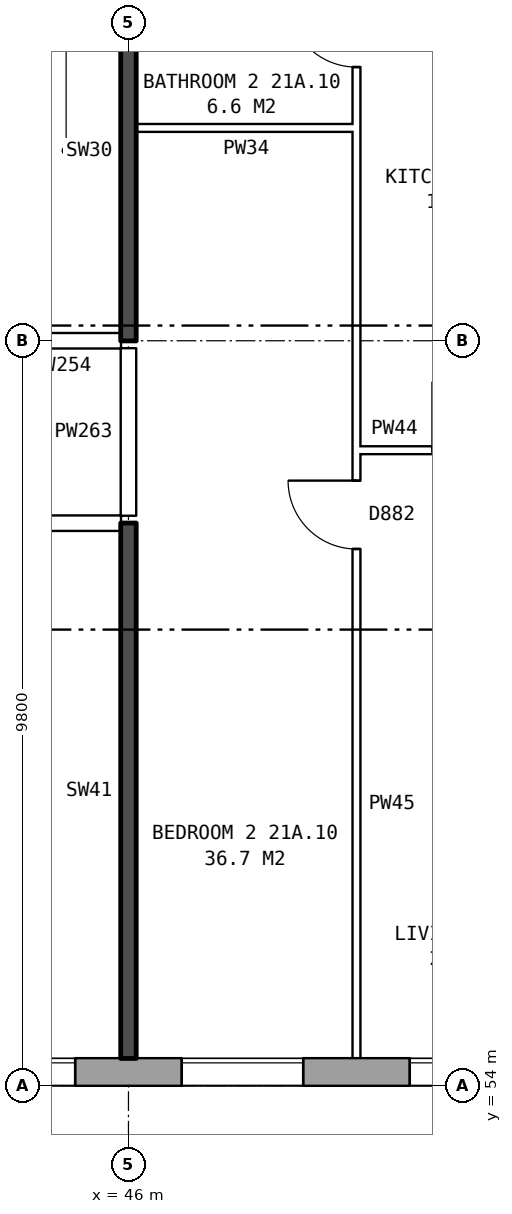
"""IFC4 building model, lengths in metres.
Left out: names, types, materials, properties, quantities, classifications, styles, units other than length and angle.
Written with IfcOpenShell. Run it as: python <this file> out.ifc"""

import sys

from ifc_helpers import new_model, si_unit, direction, frame, frame_2d, origin, place, context, subcontext, project, spatial, rectangle, extrude, element, fill, save


model = new_model("IFC4")
c1 = context("Model", 3, precision=1e-05, world=origin(), true_north=direction((0.0, 1.0)))
c2 = subcontext(c1, "Body", "Model", "MODEL_VIEW")
j1 = project(units=[si_unit("LENGTHUNIT", "METRE"), si_unit("PLANEANGLEUNIT", "RADIAN")], contexts=[c1])
p1 = place(None, origin())
s1 = spatial("IfcSite", under=j1, at=p1, CompositionType="ELEMENT")
p2 = place(p1, origin())
s2 = spatial("IfcBuilding", under=s1, at=p2, CompositionType="ELEMENT")
p3 = place(p2, frame((0.0, 0.0, 77.8)))
s3 = spatial("IfcBuildingStorey", under=s2, at=p3, CompositionType="ELEMENT", Elevation=77.8)
p4 = place(p3, frame((26.325, 54.18, 0.0), z_axis=(0.0, 0.0, 1.0), x_axis=(1.0, 0.0, 0.0)))
e1 = element("IfcWall", 1, at=p4, inside=s3, PredefinedType="STANDARD", context=c2, shape_type="SweptSolid", body=[
    extrude(rectangle(XDim=46.601, YDim=0.36, at=frame_2d((23.3, 0.0))), origin(), (0.0, 0.0, 1.0), 2.85),
])
p5 = place(p4, frame((2.375, 0.0, 0.8)))
e2 = element("IfcOpeningElement", 2, at=p5, cuts=e1, PredefinedType="OPENING", context=c2, shape_type="SweptSolid", body=[
    extrude(rectangle(XDim=1.6, YDim=1.8, at=frame_2d((0.8, 0.9))), frame((0.0, 0.19, 0.0), z_axis=(0.0, -1.0, 0.0), x_axis=(1.0, 0.0, 0.0)), (0.0, 0.0, 1.0), 0.38),
])
p6 = place(p4, frame((5.375, 0.0, 0.8)))
e3 = element("IfcOpeningElement", 3, at=p6, cuts=e1, PredefinedType="OPENING", context=c2, shape_type="SweptSolid", body=[
    extrude(rectangle(XDim=1.6, YDim=1.8, at=frame_2d((0.8, 0.9))), frame((0.0, 0.19, 0.0), z_axis=(0.0, -1.0, 0.0), x_axis=(1.0, 0.0, 0.0)), (0.0, 0.0, 1.0), 0.38),
])
p7 = place(p4, frame((7.875, 0.0, 0.8)))
e4 = element("IfcOpeningElement", 4, at=p7, cuts=e1, PredefinedType="OPENING", context=c2, shape_type="SweptSolid", body=[
    extrude(rectangle(XDim=1.6, YDim=1.8, at=frame_2d((0.8, 0.9))), frame((0.0, 0.19, 0.0), z_axis=(0.0, -1.0, 0.0), x_axis=(1.0, 0.0, 0.0)), (0.0, 0.0, 1.0), 0.38),
])
p8 = place(p4, frame((11.725, 0.0, 0.65)))
e5 = element("IfcOpeningElement", 5, at=p8, cuts=e1, PredefinedType="OPENING", context=c2, shape_type="SweptSolid", body=[
    extrude(rectangle(XDim=0.8, YDim=0.9, at=frame_2d((0.4, 0.45))), frame((0.0, 0.19, 0.0), z_axis=(0.0, -1.0, 0.0), x_axis=(1.0, 0.0, 0.0)), (0.0, 0.0, 1.0), 0.38),
])
p9 = place(p4, frame((14.375, 0.0, 0.8)))
e6 = element("IfcOpeningElement", 6, at=p9, cuts=e1, PredefinedType="OPENING", context=c2, shape_type="SweptSolid", body=[
    extrude(rectangle(XDim=1.6, YDim=1.8, at=frame_2d((0.8, 0.9))), frame((0.0, 0.19, 0.0), z_axis=(0.0, -1.0, 0.0), x_axis=(1.0, 0.0, 0.0)), (0.0, 0.0, 1.0), 0.38),
])
p10 = place(p4, frame((17.375, 0.0, 0.8)))
e7 = element("IfcOpeningElement", 7, at=p10, cuts=e1, PredefinedType="OPENING", context=c2, shape_type="SweptSolid", body=[
    extrude(rectangle(XDim=1.6, YDim=1.8, at=frame_2d((0.8, 0.9))), frame((0.0, 0.19, 0.0), z_axis=(0.0, -1.0, 0.0), x_axis=(1.0, 0.0, 0.0)), (0.0, 0.0, 1.0), 0.38),
])
p11 = place(p4, frame((20.375, 0.0, 0.8)))
e8 = element("IfcOpeningElement", 8, at=p11, cuts=e1, PredefinedType="OPENING", context=c2, shape_type="SweptSolid", body=[
    extrude(rectangle(XDim=1.6, YDim=1.8, at=frame_2d((0.8, 0.9))), frame((0.0, 0.19, 0.0), z_axis=(0.0, -1.0, 0.0), x_axis=(1.0, 0.0, 0.0)), (0.0, 0.0, 1.0), 0.38),
])
p12 = place(p4, frame((23.375, 0.0, 0.8)))
e9 = element("IfcOpeningElement", 9, at=p12, cuts=e1, PredefinedType="OPENING", context=c2, shape_type="SweptSolid", body=[
    extrude(rectangle(XDim=1.6, YDim=1.8, at=frame_2d((0.8, 0.9))), frame((0.0, 0.19, 0.0), z_axis=(0.0, -1.0, 0.0), x_axis=(1.0, 0.0, 0.0)), (0.0, 0.0, 1.0), 0.38),
])
p13 = place(p4, frame((26.375, 0.0, 0.8)))
e10 = element("IfcOpeningElement", 10, at=p13, cuts=e1, PredefinedType="OPENING", context=c2, shape_type="SweptSolid", body=[
    extrude(rectangle(XDim=1.6, YDim=1.8, at=frame_2d((0.8, 0.9))), frame((0.0, 0.19, 0.0), z_axis=(0.0, -1.0, 0.0), x_axis=(1.0, 0.0, 0.0)), (0.0, 0.0, 1.0), 0.38),
])
p14 = place(p4, frame((29.375, 0.0, 0.8)))
e11 = element("IfcOpeningElement", 11, at=p14, cuts=e1, PredefinedType="OPENING", context=c2, shape_type="SweptSolid", body=[
    extrude(rectangle(XDim=1.6, YDim=1.8, at=frame_2d((0.8, 0.9))), frame((0.0, 0.19, 0.0), z_axis=(0.0, -1.0, 0.0), x_axis=(1.0, 0.0, 0.0)), (0.0, 0.0, 1.0), 0.38),
])
p15 = place(p4, frame((32.375, 0.0, 0.8)))
e12 = element("IfcOpeningElement", 12, at=p15, cuts=e1, PredefinedType="OPENING", context=c2, shape_type="SweptSolid", body=[
    extrude(rectangle(XDim=1.6, YDim=1.8, at=frame_2d((0.8, 0.9))), frame((0.0, 0.19, 0.0), z_axis=(0.0, -1.0, 0.0), x_axis=(1.0, 0.0, 0.0)), (0.0, 0.0, 1.0), 0.38),
])
p16 = place(p4, frame((34.825, 0.0, 0.15)))
e13 = element("IfcOpeningElement", 13, at=p16, cuts=e1, PredefinedType="OPENING", context=c2, shape_type="SweptSolid", body=[
    extrude(rectangle(XDim=0.6, YDim=0.9, at=frame_2d((0.3, 0.45))), frame((0.0, 0.19, 0.0), z_axis=(0.0, -1.0, 0.0), x_axis=(1.0, 0.0, 0.0)), (0.0, 0.0, 1.0), 0.38),
])
p17 = place(p4, frame((38.375, 0.0, 0.8)))
e14 = element("IfcOpeningElement", 14, at=p17, cuts=e1, PredefinedType="OPENING", context=c2, shape_type="SweptSolid", body=[
    extrude(rectangle(XDim=1.6, YDim=1.8, at=frame_2d((0.8, 0.9))), frame((0.0, 0.19, 0.0), z_axis=(0.0, -1.0, 0.0), x_axis=(1.0, 0.0, 0.0)), (0.0, 0.0, 1.0), 0.38),
])
p18 = place(p4, frame((41.375, 0.0, 0.8)))
e15 = element("IfcOpeningElement", 15, at=p18, cuts=e1, PredefinedType="OPENING", context=c2, shape_type="SweptSolid", body=[
    extrude(rectangle(XDim=1.6, YDim=1.8, at=frame_2d((0.8, 0.9))), frame((0.0, 0.19, 0.0), z_axis=(0.0, -1.0, 0.0), x_axis=(1.0, 0.0, 0.0)), (0.0, 0.0, 1.0), 0.38),
])
p19 = place(p4, frame((44.375, 0.0, 0.8)))
e16 = element("IfcOpeningElement", 16, at=p19, cuts=e1, PredefinedType="OPENING", context=c2, shape_type="SweptSolid", body=[
    extrude(rectangle(XDim=1.6, YDim=1.8, at=frame_2d((0.8, 0.9))), frame((0.0, 0.19, 0.0), z_axis=(0.0, -1.0, 0.0), x_axis=(1.0, 0.0, 0.0)), (0.0, 0.0, 1.0), 0.38),
])
p20 = place(p4, frame((9.775, 0.0, 1.5)))
e17 = element("IfcOpeningElement", 17, at=p20, cuts=e1, PredefinedType="OPENING", context=c2, shape_type="SweptSolid", body=[
    extrude(rectangle(XDim=0.6, YDim=0.9, at=frame_2d((0.3, 0.45))), frame((0.0, 0.19, 0.0), z_axis=(0.0, -1.0, 0.0), x_axis=(1.0, 0.0, 0.0)), (0.0, 0.0, 1.0), 0.38),
])
p21 = place(p4, frame((12.825, 0.0, 0.65)))
e18 = element("IfcOpeningElement", 18, at=p21, cuts=e1, PredefinedType="OPENING", context=c2, shape_type="SweptSolid", body=[
    extrude(rectangle(XDim=0.6, YDim=1.8, at=frame_2d((0.3, 0.9))), frame((0.0, 0.19, 0.0), z_axis=(0.0, -1.0, 0.0), x_axis=(1.0, 0.0, 0.0)), (0.0, 0.0, 1.0), 0.38),
])
p22 = place(p4, frame((36.025, 0.0, 1.65)))
e19 = element("IfcOpeningElement", 19, at=p22, cuts=e1, PredefinedType="OPENING", context=c2, shape_type="SweptSolid", body=[
    extrude(rectangle(XDim=1.4, YDim=0.9, at=frame_2d((0.7, 0.45))), frame((0.0, 0.19, 0.0), z_axis=(0.0, -1.0, 0.0), x_axis=(1.0, 0.0, 0.0)), (0.0, 0.0, 1.0), 0.38),
])
p23 = place(p3, frame((23.61, 61.4, 0.0), z_axis=(0.0, 0.0, 1.0), x_axis=(1.0, 0.0, 0.0)))
e20 = element("IfcWall", 20, at=p23, inside=s3, PredefinedType="PARTITIONING", context=c2, shape_type="SweptSolid", body=[
    extrude(rectangle(XDim=22.29, YDim=0.2, at=frame_2d((11.145, 0.0))), origin(), (0.0, 0.0, 1.0), 2.85),
])
p24 = place(p23, frame((18.84, 0.0, 0.0)))
e21 = element("IfcOpeningElement", 21, at=p24, cuts=e20, PredefinedType="OPENING", context=c2, shape_type="SweptSolid", body=[
    extrude(rectangle(XDim=1.0, YDim=2.1, at=frame_2d((0.5, 1.05))), frame((0.0, 0.11, 0.0), z_axis=(0.0, -1.0, 0.0), x_axis=(1.0, 0.0, 0.0)), (0.0, 0.0, 1.0), 0.22),
])
p25 = place(p23, frame((6.89, 0.0, 0.0)))
e22 = element("IfcOpeningElement", 22, at=p25, cuts=e20, PredefinedType="OPENING", context=c2, shape_type="SweptSolid", body=[
    extrude(rectangle(XDim=1.0, YDim=2.1, at=frame_2d((0.5, 1.05))), frame((0.0, 0.11, 0.0), z_axis=(0.0, -1.0, 0.0), x_axis=(1.0, 0.0, 0.0)), (0.0, 0.0, 1.0), 0.22),
])
p26 = place(p3, frame((49.0, 62.36, 0.0), z_axis=(0.0, 0.0, 1.0), x_axis=(1.0, 0.0, 0.0)))
e23 = element("IfcWall", 23, at=p26, inside=s3, PredefinedType="PARTITIONING", context=c2, shape_type="SweptSolid", body=[
    extrude(rectangle(XDim=2.9, YDim=0.1, at=frame_2d((1.45, 0.0))), origin(), (0.0, 0.0, 1.0), 2.85),
])
p27 = place(p26, frame((1.0, 0.0, 0.0)))
e24 = element("IfcOpeningElement", 24, at=p27, cuts=e23, PredefinedType="OPENING", context=c2, shape_type="SweptSolid", body=[
    extrude(rectangle(XDim=0.9, YDim=2.1, at=frame_2d((0.45, 1.05))), frame((0.0, 0.06, 0.0), z_axis=(0.0, -1.0, 0.0), x_axis=(1.0, 0.0, 0.0)), (0.0, 0.0, 1.0), 0.12),
])
p28 = place(p3, frame((44.36, 63.8, 0.0), z_axis=(0.0, 0.0, 1.0), x_axis=(1.0, 0.0, 0.0)))
e25 = element("IfcWall", 25, at=p28, inside=s3, PredefinedType="PARTITIONING", context=c2, shape_type="SweptSolid", body=[
    extrude(rectangle(XDim=1.54, YDim=0.2, at=frame_2d((0.77, 0.0))), origin(), (0.0, 0.0, 1.0), 2.85),
])
p29 = place(p3, frame((46.1, 66.6, 0.0), z_axis=(0.0, 0.0, 1.0), x_axis=(1.0, 0.0, 0.0)))
e26 = element("IfcWall", 26, at=p29, inside=s3, PredefinedType="PARTITIONING", context=c2, shape_type="SweptSolid", body=[
    extrude(rectangle(XDim=2.9, YDim=0.1, at=frame_2d((1.45, 0.0))), origin(), (0.0, 0.0, 1.0), 2.85),
])
p30 = place(p3, frame((46.0, 54.36, 0.0), z_axis=(0.0, 0.0, 1.0), x_axis=(0.0, 1.0, 0.0)))
e27 = element("IfcWall", 27, at=p30, inside=s3, PredefinedType="SOLIDWALL", context=c2, shape_type="SweptSolid", body=[
    extrude(rectangle(XDim=7.04, YDim=0.2, at=frame_2d((3.52, 0.0))), origin(), (0.0, 0.0, 1.0), 2.85),
])
p31 = place(p3, frame((46.0, 61.5, 0.0), z_axis=(0.0, 0.0, 1.0), x_axis=(0.0, 1.0, 0.0)))
e28 = element("IfcWall", 28, at=p31, inside=s3, PredefinedType="PARTITIONING", context=c2, shape_type="SweptSolid", body=[
    extrude(rectangle(XDim=2.2, YDim=0.2, at=frame_2d((1.1, 0.0))), origin(), (0.0, 0.0, 1.0), 2.85),
])
p32 = place(p3, frame((46.0, 63.8, 0.0), z_axis=(0.0, 0.0, 1.0), x_axis=(0.0, 1.0, 0.0)))
e29 = element("IfcWall", 29, at=p32, inside=s3, PredefinedType="SOLIDWALL", context=c2, shape_type="SweptSolid", body=[
    extrude(rectangle(XDim=5.0, YDim=0.2, at=frame_2d((2.5, 0.0))), origin(), (0.0, 0.0, 1.0), 2.85),
])
p33 = place(p3, frame((49.0, 54.36, 0.0), z_axis=(0.0, 0.0, 1.0), x_axis=(0.0, 1.0, 0.0)))
e30 = element("IfcWall", 30, at=p33, inside=s3, PredefinedType="PARTITIONING", context=c2, shape_type="SweptSolid", body=[
    extrude(rectangle(XDim=14.34, YDim=0.1, at=frame_2d((7.17, 0.0))), origin(), (0.0, 0.0, 1.0), 2.85),
])
p34 = place(p33, frame((6.7, 0.0, 0.0)))
e31 = element("IfcOpeningElement", 31, at=p34, cuts=e30, PredefinedType="OPENING", context=c2, shape_type="SweptSolid", body=[
    extrude(rectangle(XDim=0.9, YDim=2.1, at=frame_2d((0.45, 1.05))), frame((0.0, 0.06, 0.0), z_axis=(0.0, -1.0, 0.0), x_axis=(1.0, 0.0, 0.0)), (0.0, 0.0, 1.0), 0.12),
])
p35 = place(p33, frame((13.04, 0.0, 0.0)))
e32 = element("IfcOpeningElement", 32, at=p35, cuts=e30, PredefinedType="OPENING", context=c2, shape_type="SweptSolid", body=[
    extrude(rectangle(XDim=0.9, YDim=2.1, at=frame_2d((0.45, 1.05))), frame((0.0, 0.06, 0.0), z_axis=(0.0, -1.0, 0.0), x_axis=(1.0, 0.0, 0.0)), (0.0, 0.0, 1.0), 0.12),
])
p36 = place(p10, origin())
e33 = element("IfcWindow", 33, at=p36, inside=s3, PartitioningType="SINGLE_PANEL", PredefinedType="WINDOW", context=c2, shape_type="SweptSolid", body=[
    extrude(rectangle(XDim=1.6, YDim=1.8, at=frame_2d((0.8, 0.9))), frame((0.0, 0.15, 0.0), z_axis=(0.0, -1.0, 0.0), x_axis=(1.0, 0.0, 0.0)), (0.0, 0.0, 1.0), 0.06),
])
fill(e7, e33)
p37 = place(p11, origin())
e34 = element("IfcWindow", 34, at=p37, inside=s3, PartitioningType="SINGLE_PANEL", PredefinedType="WINDOW", context=c2, shape_type="SweptSolid", body=[
    extrude(rectangle(XDim=1.6, YDim=1.8, at=frame_2d((0.8, 0.9))), frame((0.0, 0.15, 0.0), z_axis=(0.0, -1.0, 0.0), x_axis=(1.0, 0.0, 0.0)), (0.0, 0.0, 1.0), 0.06),
])
fill(e8, e34)
p38 = place(p12, origin())
e35 = element("IfcWindow", 35, at=p38, inside=s3, PartitioningType="SINGLE_PANEL", PredefinedType="WINDOW", context=c2, shape_type="SweptSolid", body=[
    extrude(rectangle(XDim=1.6, YDim=1.8, at=frame_2d((0.8, 0.9))), frame((0.0, 0.15, 0.0), z_axis=(0.0, -1.0, 0.0), x_axis=(1.0, 0.0, 0.0)), (0.0, 0.0, 1.0), 0.06),
])
fill(e9, e35)
p39 = place(p34, origin())
e36 = element("IfcDoor", 36, at=p39, inside=s3, OperationType="SINGLE_SWING_RIGHT", PredefinedType="DOOR", context=c2, shape_type="SweptSolid", body=[
    extrude(rectangle(XDim=0.9, YDim=2.1, at=frame_2d((0.45, 1.05))), frame((0.0, 0.025, 0.0), z_axis=(0.0, -1.0, 0.0), x_axis=(1.0, 0.0, 0.0)), (0.0, 0.0, 1.0), 0.05),
])
fill(e31, e36)
p40 = place(p35, origin())
e37 = element("IfcDoor", 37, at=p40, inside=s3, OperationType="SINGLE_SWING_RIGHT", PredefinedType="DOOR", context=c2, shape_type="SweptSolid", body=[
    extrude(rectangle(XDim=0.9, YDim=2.1, at=frame_2d((0.45, 1.05))), frame((0.0, 0.025, 0.0), z_axis=(0.0, -1.0, 0.0), x_axis=(1.0, 0.0, 0.0)), (0.0, 0.0, 1.0), 0.05),
])
fill(e32, e37)
save(model, sys.argv[1])
